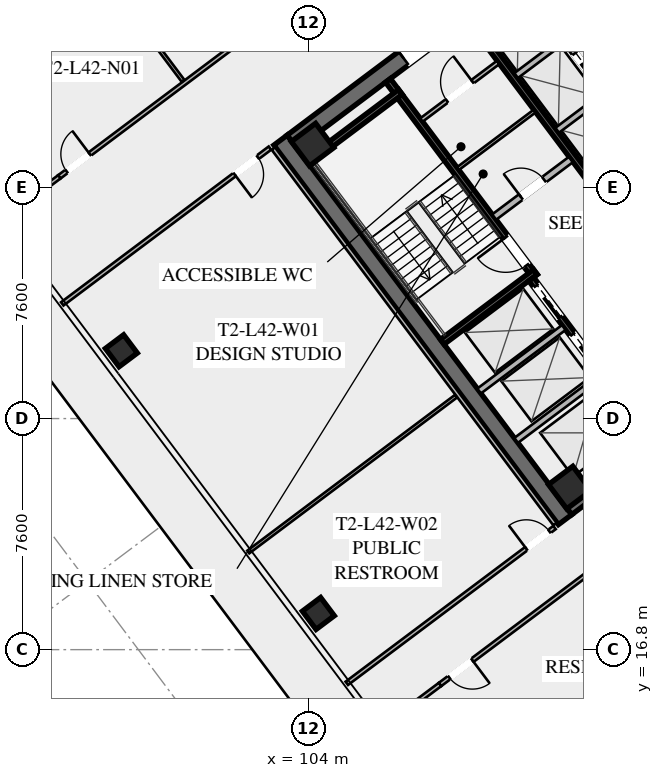
"""IFC4 building model, lengths in metres.
Left out: names, types, materials, properties, quantities, classifications, styles, units other than length and angle.
Written with IfcOpenShell. Run it as: python <this file> out.ifc"""

import sys

from ifc_helpers import new_model, si_unit, direction, frame, frame_2d, origin, origin_2d, place, context, subcontext, project, spatial, rectangle, hollow_rectangle, extrude, element, fill, save


model = new_model("IFC4")
c1 = context("Model", 3, precision=1e-05, world=origin(), true_north=direction((0.0, 1.0)))
c2 = subcontext(c1, "Body", "Model", "MODEL_VIEW")
j1 = project(units=[si_unit("LENGTHUNIT", "METRE"), si_unit("PLANEANGLEUNIT", "RADIAN")], contexts=[c1])
p1 = place(None, origin())
s1 = spatial("IfcSite", under=j1, at=p1, CompositionType="ELEMENT")
p2 = place(p1, origin())
s2 = spatial("IfcBuilding", under=s1, at=p2, CompositionType="ELEMENT")
p3 = place(p2, frame((0.0, 0.0, 157.0)))
s3 = spatial("IfcBuildingStorey", under=s2, at=p3, CompositionType="ELEMENT", Elevation=157.0)
p4 = place(p3, frame((112.436, 21.077, 0.0), z_axis=(0.0, 0.0, 1.0), x_axis=(-0.600005007985, 0.799996243986, 0.0)))
e1 = element("IfcWall", 1, at=p4, inside=s3, PredefinedType="SHEAR", context=c2, shape_type="SweptSolid", body=[
    extrude(rectangle(XDim=15.6, YDim=0.55, at=frame_2d((7.8, 0.0))), origin(), (0.0, 0.0, 1.0), 3.55),
])
p5 = place(p3, frame((124.539, 30.498, 0.0), z_axis=(0.0, 0.0, 1.0), x_axis=(-0.799998054672, -0.600002593761, 0.0)))
e2 = element("IfcWall", 2, at=p5, inside=s3, PredefinedType="SHEAR", context=c2, shape_type="SweptSolid", body=[
    extrude(rectangle(XDim=15.06, YDim=0.55, at=frame_2d((7.53, 0.0))), origin(), (0.0, 0.0, 1.0), 3.55),
])
p6 = place(p5, frame((9.23, 0.0, 0.0)))
e3 = element("IfcOpeningElement", 3, at=p6, cuts=e2, PredefinedType="OPENING", context=c2, shape_type="SweptSolid", body=[
    extrude(rectangle(XDim=1.25, YDim=2.25, at=frame_2d((0.625, 1.125))), frame((0.0, 0.285, 0.0), z_axis=(0.0, -1.0, 0.0), x_axis=(1.0, 0.0, 0.0)), (0.0, 0.0, 1.0), 0.57),
])
p7 = place(p5, frame((4.18, 0.0, 0.0)))
e4 = element("IfcOpeningElement", 4, at=p7, cuts=e2, PredefinedType="OPENING", context=c2, shape_type="SweptSolid", body=[
    extrude(rectangle(XDim=1.25, YDim=2.25, at=frame_2d((0.625, 1.125))), frame((0.0, 0.285, 0.0), z_axis=(0.0, -1.0, 0.0), x_axis=(1.0, 0.0, 0.0)), (0.0, 0.0, 1.0), 0.57),
])
p8 = place(p3, frame((103.461, 33.502, 0.0), z_axis=(0.0, 0.0, 1.0), x_axis=(0.799998054672, 0.600002593761, 0.0)))
e5 = element("IfcWall", 5, at=p8, inside=s3, PredefinedType="SHEAR", context=c2, shape_type="SweptSolid", body=[
    extrude(rectangle(XDim=15.06, YDim=0.55, at=frame_2d((7.53, 0.0))), origin(), (0.0, 0.0, 1.0), 3.55),
])
p9 = place(p8, frame((4.58, 0.0, 0.0)))
e6 = element("IfcOpeningElement", 6, at=p9, cuts=e5, PredefinedType="OPENING", context=c2, shape_type="SweptSolid", body=[
    extrude(rectangle(XDim=1.25, YDim=2.25, at=frame_2d((0.625, 1.125))), frame((0.0, 0.285, 0.0), z_axis=(0.0, -1.0, 0.0), x_axis=(1.0, 0.0, 0.0)), (0.0, 0.0, 1.0), 0.57),
])
p10 = place(p8, frame((9.63, 0.0, 0.0)))
e7 = element("IfcOpeningElement", 7, at=p10, cuts=e5, PredefinedType="OPENING", context=c2, shape_type="SweptSolid", body=[
    extrude(rectangle(XDim=1.25, YDim=2.25, at=frame_2d((0.625, 1.125))), frame((0.0, 0.285, 0.0), z_axis=(0.0, -1.0, 0.0), x_axis=(1.0, 0.0, 0.0)), (0.0, 0.0, 1.0), 0.57),
])
for number, where, z_axis, x_axis in (
    (8, (112.59, 22.13, 0.0), (0.0, 0.0, 1.0), (0.8, 0.6, 0.0)),
    (9, (104.13, 33.41, 0.0), (0.0, 0.0, 1.0), (0.8, 0.6, 0.0)),
):
    element("IfcColumn", number, at=place(p3, frame(where, z_axis=z_axis, x_axis=x_axis)), inside=s3, PredefinedType="COLUMN", context=c2, shape_type="SweptSolid", body=[
        extrude(hollow_rectangle(XDim=1.0, YDim=1.0, WallThickness=0.04, at=origin_2d()), origin(), (0.0, 0.0, 1.0), 3.37),
    ])
for number, where, z_axis, x_axis in (
    (10, (97.84, 26.63, -0.175), (0.0, 0.0, 1.0), (0.8, 0.6, 0.0)),
    (11, (104.32, 17.99, -0.175), (0.0, 0.0, 1.0), (0.8, 0.6, 0.0)),
):
    element("IfcColumn", number, at=place(p3, frame(where, z_axis=z_axis, x_axis=x_axis)), inside=s3, PredefinedType="COLUMN", context=c2, shape_type="SweptSolid", body=[
        extrude(hollow_rectangle(XDim=0.75, YDim=0.75, WallThickness=0.032, at=origin_2d()), origin(), (0.0, 0.0, 1.0), 3.545),
    ])
p11 = place(p3, frame((111.44, 29.08, 0.0), z_axis=(0.0, 0.0, 1.0), x_axis=(-0.59999029481, 0.8000072788, 0.0)))
e12 = element("IfcWall", 12, at=p11, inside=s3, PredefinedType="SHEAR", context=c2, shape_type="SweptSolid", body=[
    extrude(rectangle(XDim=8.05, YDim=0.2, at=frame_2d((4.025, 0.0))), origin(), (0.0, 0.0, 1.0), 3.37),
])
p12 = place(p11, frame((0.45, 0.0, 0.0)))
e13 = element("IfcOpeningElement", 13, at=p12, cuts=e12, PredefinedType="OPENING", context=c2, shape_type="SweptSolid", body=[
    extrude(rectangle(XDim=1.15, YDim=2.2, at=frame_2d((0.575, 1.1))), frame((0.0, 0.11, 0.0), z_axis=(0.0, -1.0, 0.0), x_axis=(1.0, 0.0, 0.0)), (0.0, 0.0, 1.0), 0.22),
])
for number, where, z_axis, x_axis in (
    (14, (108.396, 26.922, 0.0), (0.0, 0.0, 1.0), (0.8, 0.6, 0.0)),
    (15, (103.956, 32.842, 0.0), (0.0, 0.0, 1.0), (0.8, 0.6, 0.0)),
):
    element("IfcWall", number, at=place(p3, frame(where, z_axis=z_axis, x_axis=x_axis)), inside=s3, PredefinedType="SHEAR", context=c2, shape_type="SweptSolid", body=[
        extrude(rectangle(XDim=3.83, YDim=0.2, at=frame_2d((1.915, 0.0))), origin(), (0.0, 0.0, 1.0), 3.37),
    ])
p13 = place(p3, frame((117.998, 25.936, 0.0), z_axis=(0.0, 0.0, 1.0), x_axis=(-0.600002693989, 0.799997979501, 0.0)))
e16 = element("IfcWall", 16, at=p13, inside=s3, PredefinedType="SHEAR", context=c2, shape_type="SweptSolid", body=[
    extrude(rectangle(XDim=14.5, YDim=0.2, at=frame_2d((7.25, 0.0))), origin(), (0.0, 0.0, 1.0), 3.37),
])
p14 = place(p3, frame((110.104, 31.028, 0.0), z_axis=(0.0, 0.0, 1.0), x_axis=(0.800018601094, 0.59997519774, 0.0)))
e17 = element("IfcWall", 17, at=p14, inside=s3, PredefinedType="SOLIDWALL", context=c2, shape_type="SweptSolid", body=[
    extrude(rectangle(XDim=3.15, YDim=0.22, at=frame_2d((1.575, 0.0))), origin(), (0.0, 0.0, 1.0), 2.723),
])
p15 = place(p14, frame((1.1, 0.0, 0.0)))
e18 = element("IfcOpeningElement", 18, at=p15, cuts=e17, PredefinedType="OPENING", context=c2, shape_type="SweptSolid", body=[
    extrude(rectangle(XDim=0.95, YDim=2.05, at=frame_2d((0.475, 1.025))), frame((0.0, 0.12, 0.0), z_axis=(0.0, -1.0, 0.0), x_axis=(1.0, 0.0, 0.0)), (0.0, 0.0, 1.0), 0.24),
])
p16 = place(p3, frame((115.19, 23.83, 0.0), z_axis=(0.0, 0.0, 1.0), x_axis=(-0.599993943644, 0.800004542231, 0.0)))
e19 = element("IfcWall", 19, at=p16, inside=s3, PredefinedType="SHEAR", context=c2, shape_type="SweptSolid", body=[
    extrude(rectangle(XDim=6.45, YDim=0.2, at=frame_2d((3.225, 0.0))), origin(), (0.0, 0.0, 1.0), 3.37),
])
p17 = place(p16, frame((4.875, 0.0, 0.0)))
e20 = element("IfcOpeningElement", 20, at=p17, cuts=e19, PredefinedType="OPENING", context=c2, shape_type="SweptSolid", body=[
    extrude(rectangle(XDim=1.3, YDim=2.25, at=frame_2d((0.65, 1.125))), frame((0.0, 0.11, 0.0), z_axis=(0.0, -1.0, 0.0), x_axis=(1.0, 0.0, 0.0)), (0.0, 0.0, 1.0), 0.22),
])
p18 = place(p16, frame((2.875, 0.0, 0.0)))
e21 = element("IfcOpeningElement", 21, at=p18, cuts=e19, PredefinedType="OPENING", context=c2, shape_type="SweptSolid", body=[
    extrude(rectangle(XDim=1.3, YDim=2.25, at=frame_2d((0.65, 1.125))), frame((0.0, 0.11, 0.0), z_axis=(0.0, -1.0, 0.0), x_axis=(1.0, 0.0, 0.0)), (0.0, 0.0, 1.0), 0.22),
])
p19 = place(p16, frame((0.675, 0.0, 0.0)))
e22 = element("IfcOpeningElement", 22, at=p19, cuts=e19, PredefinedType="OPENING", context=c2, shape_type="SweptSolid", body=[
    extrude(rectangle(XDim=1.3, YDim=2.25, at=frame_2d((0.65, 1.125))), frame((0.0, 0.11, 0.0), z_axis=(0.0, -1.0, 0.0), x_axis=(1.0, 0.0, 0.0)), (0.0, 0.0, 1.0), 0.22),
])
for number, where, z_axis, x_axis in (
    (23, (110.826, 23.682, 0.0), (0.0, 0.0, 1.0), (0.8, 0.6, 0.0)),
    (24, (109.608, 25.306, 0.0), (0.0, 0.0, 1.0), (0.8, 0.6, 0.0)),
):
    element("IfcWall", number, at=place(p3, frame(where, z_axis=z_axis, x_axis=x_axis)), inside=s3, PredefinedType="SOLIDWALL", context=c2, shape_type="SweptSolid", body=[
        extrude(rectangle(XDim=3.48, YDim=0.2, at=frame_2d((1.74, 0.0))), origin(), (0.0, 0.0, 1.0), 3.37),
    ])
p20 = place(p3, frame((112.81, 40.17, 0.0), z_axis=(0.0, 0.0, 1.0), x_axis=(0.599993943644, -0.800004542231, 0.0)))
e25 = element("IfcWall", 25, at=p20, inside=s3, PredefinedType="SHEAR", context=c2, shape_type="SweptSolid", body=[
    extrude(rectangle(XDim=6.45, YDim=0.2, at=frame_2d((3.225, 0.0))), origin(), (0.0, 0.0, 1.0), 3.37),
])
p21 = place(p3, frame((107.71, 34.22, 0.0), z_axis=(0.0, 0.0, 1.0), x_axis=(0.799981399002, 0.60002480053, 0.0)))
e26 = element("IfcWall", 26, at=p21, inside=s3, PredefinedType="PARTITIONING", context=c2, shape_type="SweptSolid", body=[
    extrude(rectangle(XDim=3.15, YDim=0.135, at=frame_2d((1.575, 0.0))), origin(), (0.0, 0.0, 1.0), 2.723),
])
p22 = place(p21, frame((1.05, 0.0, 0.0)))
e27 = element("IfcOpeningElement", 27, at=p22, cuts=e26, PredefinedType="OPENING", context=c2, shape_type="SweptSolid", body=[
    extrude(rectangle(XDim=1.05, YDim=2.2, at=frame_2d((0.525, 1.1))), frame((0.0, 0.077, 0.0), z_axis=(0.0, -1.0, 0.0), x_axis=(1.0, 0.0, 0.0)), (0.0, 0.0, 1.0), 0.155),
])
p23 = place(p3, frame((108.91, 32.62, 0.0), z_axis=(0.0, 0.0, 1.0), x_axis=(0.800018601094, 0.59997519774, 0.0)))
e28 = element("IfcWall", 28, at=p23, inside=s3, PredefinedType="PARTITIONING", context=c2, shape_type="SweptSolid", body=[
    extrude(rectangle(XDim=3.15, YDim=0.11, at=frame_2d((1.575, 0.0))), origin(), (0.0, 0.0, 1.0), 2.723),
])
p24 = place(p3, frame((115.11, 33.27, 0.0), z_axis=(0.0, 0.0, 1.0), x_axis=(-0.600011322243, 0.799991508192, 0.0)))
e29 = element("IfcWall", 29, at=p24, inside=s3, PredefinedType="SOLIDWALL", context=c2, shape_type="SweptSolid", body=[
    extrude(rectangle(XDim=6.9, YDim=0.2, at=frame_2d((3.45, 0.0))), origin(), (0.0, 0.0, 1.0), 3.37),
])
p25 = place(p24, frame((0.575, 0.0, 0.0)))
e30 = element("IfcOpeningElement", 30, at=p25, cuts=e29, PredefinedType="OPENING", context=c2, shape_type="SweptSolid", body=[
    extrude(rectangle(XDim=1.1, YDim=2.2, at=frame_2d((0.55, 1.1))), frame((0.0, 0.11, 0.0), z_axis=(0.0, -1.0, 0.0), x_axis=(1.0, 0.0, 0.0)), (0.0, 0.0, 1.0), 0.22),
])
p26 = place(p24, frame((2.825, 0.0, 0.0)))
e31 = element("IfcOpeningElement", 31, at=p26, cuts=e29, PredefinedType="OPENING", context=c2, shape_type="SweptSolid", body=[
    extrude(rectangle(XDim=1.1, YDim=2.2, at=frame_2d((0.55, 1.1))), frame((0.0, 0.11, 0.0), z_axis=(0.0, -1.0, 0.0), x_axis=(1.0, 0.0, 0.0)), (0.0, 0.0, 1.0), 0.22),
])
p27 = place(p24, frame((5.075, 0.0, 0.0)))
e32 = element("IfcOpeningElement", 32, at=p27, cuts=e29, PredefinedType="OPENING", context=c2, shape_type="SweptSolid", body=[
    extrude(rectangle(XDim=1.1, YDim=2.2, at=frame_2d((0.55, 1.1))), frame((0.0, 0.11, 0.0), z_axis=(0.0, -1.0, 0.0), x_axis=(1.0, 0.0, 0.0)), (0.0, 0.0, 1.0), 0.22),
])
p28 = place(p3, frame((112.176, 33.882, 0.0), z_axis=(0.0, 0.0, 1.0), x_axis=(0.8, 0.6, 0.0)))
e33 = element("IfcWall", 33, at=p28, inside=s3, PredefinedType="SOLIDWALL", context=c2, shape_type="SweptSolid", body=[
    extrude(rectangle(XDim=1.88, YDim=0.2, at=frame_2d((0.94, 0.0))), origin(), (0.0, 0.0, 1.0), 3.37),
])
p29 = place(p3, frame((110.826, 35.682, 0.0), z_axis=(0.0, 0.0, 1.0), x_axis=(0.799984418148, 0.600020775241, 0.0)))
e34 = element("IfcWall", 34, at=p29, inside=s3, PredefinedType="SOLIDWALL", context=c2, shape_type="SweptSolid", body=[
    extrude(rectangle(XDim=1.88, YDim=0.2, at=frame_2d((0.94, 0.0))), origin(), (0.0, 0.0, 1.0), 3.37),
])
p30 = place(p3, frame((95.8, 32.35, 0.0), z_axis=(0.0, 0.0, 1.0), x_axis=(0.8, 0.6, 0.0)))
e35 = element("IfcWall", 35, at=p30, inside=s3, PredefinedType="PARTITIONING", context=c2, shape_type="SweptSolid", body=[
    extrude(rectangle(XDim=28.7, YDim=0.135, at=frame_2d((14.35, 0.0))), origin(), (0.0, 0.0, 1.0), 2.723),
])
p31 = place(p30, frame((0.3, 0.0, 0.0)))
e36 = element("IfcOpeningElement", 36, at=p31, cuts=e35, PredefinedType="OPENING", context=c2, shape_type="SweptSolid", body=[
    extrude(rectangle(XDim=0.95, YDim=2.05, at=frame_2d((0.475, 1.025))), frame((0.0, 0.077, 0.0), z_axis=(0.0, -1.0, 0.0), x_axis=(1.0, 0.0, 0.0)), (0.0, 0.0, 1.0), 0.155),
])
p32 = place(p30, frame((9.959, 0.0, 0.0)))
e37 = element("IfcOpeningElement", 37, at=p32, cuts=e35, PredefinedType="OPENING", context=c2, shape_type="SweptSolid", body=[
    extrude(rectangle(XDim=0.95, YDim=2.05, at=frame_2d((0.475, 1.025))), frame((0.0, 0.077, 0.0), z_axis=(0.0, -1.0, 0.0), x_axis=(1.0, 0.0, 0.0)), (0.0, 0.0, 1.0), 0.155),
])
p33 = place(p30, frame((14.005, 0.0, 0.0)))
e38 = element("IfcOpeningElement", 38, at=p33, cuts=e35, PredefinedType="OPENING", context=c2, shape_type="SweptSolid", body=[
    extrude(rectangle(XDim=0.95, YDim=2.05, at=frame_2d((0.475, 1.025))), frame((0.0, 0.077, 0.0), z_axis=(0.0, -1.0, 0.0), x_axis=(1.0, 0.0, 0.0)), (0.0, 0.0, 1.0), 0.155),
])
p34 = place(p30, frame((18.049, 0.0, 0.0)))
e39 = element("IfcOpeningElement", 39, at=p34, cuts=e35, PredefinedType="OPENING", context=c2, shape_type="SweptSolid", body=[
    extrude(rectangle(XDim=0.95, YDim=2.05, at=frame_2d((0.475, 1.025))), frame((0.0, 0.077, 0.0), z_axis=(0.0, -1.0, 0.0), x_axis=(1.0, 0.0, 0.0)), (0.0, 0.0, 1.0), 0.155),
])
p35 = place(p30, frame((27.45, 0.0, 0.0)))
e40 = element("IfcOpeningElement", 40, at=p35, cuts=e35, PredefinedType="OPENING", context=c2, shape_type="SweptSolid", body=[
    extrude(rectangle(XDim=0.95, YDim=2.05, at=frame_2d((0.475, 1.025))), frame((0.0, 0.077, 0.0), z_axis=(0.0, -1.0, 0.0), x_axis=(1.0, 0.0, 0.0)), (0.0, 0.0, 1.0), 0.155),
])
p36 = place(p3, frame((93.856, 30.892, 0.0), z_axis=(0.0, 0.0, 1.0), x_axis=(0.800012055778, 0.599983925293, 0.0)))
e41 = element("IfcWall", 41, at=p36, inside=s3, PredefinedType="PARTITIONING", context=c2, shape_type="SweptSolid", body=[
    extrude(rectangle(XDim=2.43, YDim=0.135, at=frame_2d((1.215, 0.0))), origin(), (0.0, 0.0, 1.0), 2.723),
])
p37 = place(p3, frame((99.872, 35.504, 0.0), z_axis=(0.0, 0.0, 1.0), x_axis=(-0.599992897893, 0.800005326531, 0.0)))
e42 = element("IfcWall", 42, at=p37, inside=s3, PredefinedType="PARTITIONING", context=c2, shape_type="SweptSolid", body=[
    extrude(rectangle(XDim=5.5, YDim=0.11, at=frame_2d((2.75, 0.0))), origin(), (0.0, 0.0, 1.0), 2.723),
])
p38 = place(p3, frame((131.282, 32.874, 0.0), z_axis=(0.0, 0.0, 1.0), x_axis=(-0.8, -0.6, 0.0)))
e43 = element("IfcWall", 43, at=p38, inside=s3, PredefinedType="PARTITIONING", context=c2, shape_type="SweptSolid", body=[
    extrude(rectangle(XDim=28.7, YDim=0.135, at=frame_2d((14.35, 0.0))), origin(), (0.0, 0.0, 1.0), 2.723),
])
p39 = place(p38, frame((27.37, 0.0, 0.0)))
e44 = element("IfcOpeningElement", 44, at=p39, cuts=e43, PredefinedType="OPENING", context=c2, shape_type="SweptSolid", body=[
    extrude(rectangle(XDim=0.95, YDim=2.05, at=frame_2d((0.475, 1.025))), frame((0.0, 0.077, 0.0), z_axis=(0.0, -1.0, 0.0), x_axis=(1.0, 0.0, 0.0)), (0.0, 0.0, 1.0), 0.155),
])
p40 = place(p38, frame((13.592, 0.0, 0.0)))
e45 = element("IfcOpeningElement", 45, at=p40, cuts=e43, PredefinedType="OPENING", context=c2, shape_type="SweptSolid", body=[
    extrude(rectangle(XDim=0.95, YDim=2.05, at=frame_2d((0.475, 1.025))), frame((0.0, 0.077, 0.0), z_axis=(0.0, -1.0, 0.0), x_axis=(1.0, 0.0, 0.0)), (0.0, 0.0, 1.0), 0.155),
])
p41 = place(p38, frame((0.38, 0.0, 0.0)))
e46 = element("IfcOpeningElement", 46, at=p41, cuts=e43, PredefinedType="OPENING", context=c2, shape_type="SweptSolid", body=[
    extrude(rectangle(XDim=0.95, YDim=2.05, at=frame_2d((0.475, 1.025))), frame((0.0, 0.077, 0.0), z_axis=(0.0, -1.0, 0.0), x_axis=(1.0, 0.0, 0.0)), (0.0, 0.0, 1.0), 0.155),
])
p42 = place(p3, frame((106.378, 14.196, 0.0), z_axis=(0.0, 0.0, 1.0), x_axis=(0.800012055778, 0.599983925293, 0.0)))
e47 = element("IfcWall", 47, at=p42, inside=s3, PredefinedType="PARTITIONING", context=c2, shape_type="SweptSolid", body=[
    extrude(rectangle(XDim=2.43, YDim=0.135, at=frame_2d((1.215, 0.0))), origin(), (0.0, 0.0, 1.0), 2.723),
])
p43 = place(p3, frame((112.104, 20.928, 0.0), z_axis=(0.0, 0.0, 1.0), x_axis=(-0.599994940075, 0.800003794918, 0.0)))
e48 = element("IfcWall", 48, at=p43, inside=s3, PredefinedType="PARTITIONING", context=c2, shape_type="SweptSolid", body=[
    extrude(rectangle(XDim=15.44, YDim=0.135, at=frame_2d((7.72, 0.0))), origin(), (0.0, 0.0, 1.0), 2.723),
])
p44 = place(p3, frame((102.728, 33.296, 0.0), z_axis=(0.0, 0.0, 1.0), x_axis=(-0.800013722153, -0.59998170336, 0.0)))
e49 = element("IfcWall", 49, at=p44, inside=s3, PredefinedType="PARTITIONING", context=c2, shape_type="SweptSolid", body=[
    extrude(rectangle(XDim=8.54, YDim=0.135, at=frame_2d((4.27, 0.0))), origin(), (0.0, 0.0, 1.0), 2.723),
])
p45 = place(p44, frame((0.5, 0.0, 0.0)))
e50 = element("IfcOpeningElement", 50, at=p45, cuts=e49, PredefinedType="OPENING", context=c2, shape_type="SweptSolid", body=[
    extrude(rectangle(XDim=0.95, YDim=2.05, at=frame_2d((0.475, 1.025))), frame((0.0, 0.077, 0.0), z_axis=(0.0, -1.0, 0.0), x_axis=(1.0, 0.0, 0.0)), (0.0, 0.0, 1.0), 0.155),
])
p46 = place(p3, frame((105.256, 15.692, 0.0), z_axis=(0.0, 0.0, 1.0), x_axis=(0.799989708052, 0.600013722352, 0.0)))
e51 = element("IfcWall", 51, at=p46, inside=s3, PredefinedType="PARTITIONING", context=c2, shape_type="SweptSolid", body=[
    extrude(rectangle(XDim=8.54, YDim=0.135, at=frame_2d((4.27, 0.0))), origin(), (0.0, 0.0, 1.0), 2.723),
])
p47 = place(p46, frame((7.38, 0.0, 0.0)))
e52 = element("IfcOpeningElement", 52, at=p47, cuts=e51, PredefinedType="OPENING", context=c2, shape_type="SweptSolid", body=[
    extrude(rectangle(XDim=0.95, YDim=2.05, at=frame_2d((0.475, 1.025))), frame((0.0, 0.077, 0.0), z_axis=(0.0, -1.0, 0.0), x_axis=(1.0, 0.0, 0.0)), (0.0, 0.0, 1.0), 0.155),
])
p48 = place(p3, frame((102.016, 20.012, 0.0), z_axis=(0.0, 0.0, 1.0), x_axis=(0.799989708052, 0.600013722352, 0.0)))
e53 = element("IfcWall", 53, at=p48, inside=s3, PredefinedType="PARTITIONING", context=c2, shape_type="SweptSolid", body=[
    extrude(rectangle(XDim=8.54, YDim=0.11, at=frame_2d((4.27, 0.0))), origin(), (0.0, 0.0, 1.0), 2.723),
])
p49 = place(p9, origin())
e54 = element("IfcDoor", 54, at=p49, inside=s3, OperationType="SINGLE_SWING_LEFT", PredefinedType="DOOR", context=c2, shape_type="SweptSolid", body=[
    extrude(rectangle(XDim=1.25, YDim=2.25, at=frame_2d((0.625, 1.125))), frame((0.0, 0.025, 0.0), z_axis=(0.0, -1.0, 0.0), x_axis=(1.0, 0.0, 0.0)), (0.0, 0.0, 1.0), 0.05),
])
fill(e6, e54)
p50 = place(p12, origin())
e55 = element("IfcDoor", 55, at=p50, inside=s3, OperationType="SINGLE_SWING_RIGHT", PredefinedType="DOOR", context=c2, shape_type="SweptSolid", body=[
    extrude(rectangle(XDim=1.15, YDim=2.2, at=frame_2d((0.575, 1.1))), frame((0.0, 0.025, 0.0), z_axis=(0.0, -1.0, 0.0), x_axis=(1.0, 0.0, 0.0)), (0.0, 0.0, 1.0), 0.05),
])
fill(e13, e55)
p51 = place(p22, origin())
e56 = element("IfcDoor", 56, at=p51, inside=s3, OperationType="SINGLE_SWING_RIGHT", PredefinedType="DOOR", context=c2, shape_type="SweptSolid", body=[
    extrude(rectangle(XDim=1.05, YDim=2.2, at=frame_2d((0.525, 1.1))), frame((0.0, 0.025, 0.0), z_axis=(0.0, -1.0, 0.0), x_axis=(1.0, 0.0, 0.0)), (0.0, 0.0, 1.0), 0.05),
])
fill(e27, e56)
p52 = place(p15, origin())
e57 = element("IfcDoor", 57, at=p52, inside=s3, OperationType="SINGLE_SWING_LEFT", PredefinedType="DOOR", context=c2, shape_type="SweptSolid", body=[
    extrude(rectangle(XDim=0.95, YDim=2.05, at=frame_2d((0.475, 1.025))), frame((0.0, 0.025, 0.0), z_axis=(0.0, -1.0, 0.0), x_axis=(1.0, 0.0, 0.0)), (0.0, 0.0, 1.0), 0.05),
])
fill(e18, e57)
p53 = place(p31, origin())
e58 = element("IfcDoor", 58, at=p53, inside=s3, OperationType="SINGLE_SWING_RIGHT", PredefinedType="DOOR", context=c2, shape_type="SweptSolid", body=[
    extrude(rectangle(XDim=0.95, YDim=2.05, at=frame_2d((0.475, 1.025))), frame((0.0, 0.025, 0.0), z_axis=(0.0, -1.0, 0.0), x_axis=(1.0, 0.0, 0.0)), (0.0, 0.0, 1.0), 0.05),
])
fill(e36, e58)
p54 = place(p39, origin())
e59 = element("IfcDoor", 59, at=p54, inside=s3, OperationType="SINGLE_SWING_LEFT", PredefinedType="DOOR", context=c2, shape_type="SweptSolid", body=[
    extrude(rectangle(XDim=0.95, YDim=2.05, at=frame_2d((0.475, 1.025))), frame((0.0, 0.025, 0.0), z_axis=(0.0, -1.0, 0.0), x_axis=(1.0, 0.0, 0.0)), (0.0, 0.0, 1.0), 0.05),
])
fill(e44, e59)
p55 = place(p45, origin())
e60 = element("IfcDoor", 60, at=p55, inside=s3, OperationType="SINGLE_SWING_RIGHT", PredefinedType="DOOR", context=c2, shape_type="SweptSolid", body=[
    extrude(rectangle(XDim=0.95, YDim=2.05, at=frame_2d((0.475, 1.025))), frame((0.0, 0.025, 0.0), z_axis=(0.0, -1.0, 0.0), x_axis=(1.0, 0.0, 0.0)), (0.0, 0.0, 1.0), 0.05),
])
fill(e50, e60)
p56 = place(p47, origin())
e61 = element("IfcDoor", 61, at=p56, inside=s3, OperationType="SINGLE_SWING_LEFT", PredefinedType="DOOR", context=c2, shape_type="SweptSolid", body=[
    extrude(rectangle(XDim=0.95, YDim=2.05, at=frame_2d((0.475, 1.025))), frame((0.0, 0.025, 0.0), z_axis=(0.0, -1.0, 0.0), x_axis=(1.0, 0.0, 0.0)), (0.0, 0.0, 1.0), 0.05),
])
fill(e52, e61)
p57 = place(p17, origin())
e62 = element("IfcDoor", 62, at=p57, inside=s3, OperationType="SLIDING_TO_LEFT", PredefinedType="DOOR", context=c2, shape_type="SweptSolid", body=[
    extrude(rectangle(XDim=1.3, YDim=2.25, at=frame_2d((0.65, 1.125))), frame((0.0, 0.025, 0.0), z_axis=(0.0, -1.0, 0.0), x_axis=(1.0, 0.0, 0.0)), (0.0, 0.0, 1.0), 0.05),
])
fill(e20, e62)
p58 = place(p18, origin())
e63 = element("IfcDoor", 63, at=p58, inside=s3, OperationType="SLIDING_TO_LEFT", PredefinedType="DOOR", context=c2, shape_type="SweptSolid", body=[
    extrude(rectangle(XDim=1.3, YDim=2.25, at=frame_2d((0.65, 1.125))), frame((0.0, 0.025, 0.0), z_axis=(0.0, -1.0, 0.0), x_axis=(1.0, 0.0, 0.0)), (0.0, 0.0, 1.0), 0.05),
])
fill(e21, e63)
p59 = place(p26, origin())
e64 = element("IfcDoor", 64, at=p59, inside=s3, OperationType="SLIDING_TO_LEFT", PredefinedType="DOOR", context=c2, shape_type="SweptSolid", body=[
    extrude(rectangle(XDim=1.1, YDim=2.2, at=frame_2d((0.55, 1.1))), frame((0.0, 0.025, 0.0), z_axis=(0.0, -1.0, 0.0), x_axis=(1.0, 0.0, 0.0)), (0.0, 0.0, 1.0), 0.05),
])
fill(e31, e64)
save(model, sys.argv[1])
